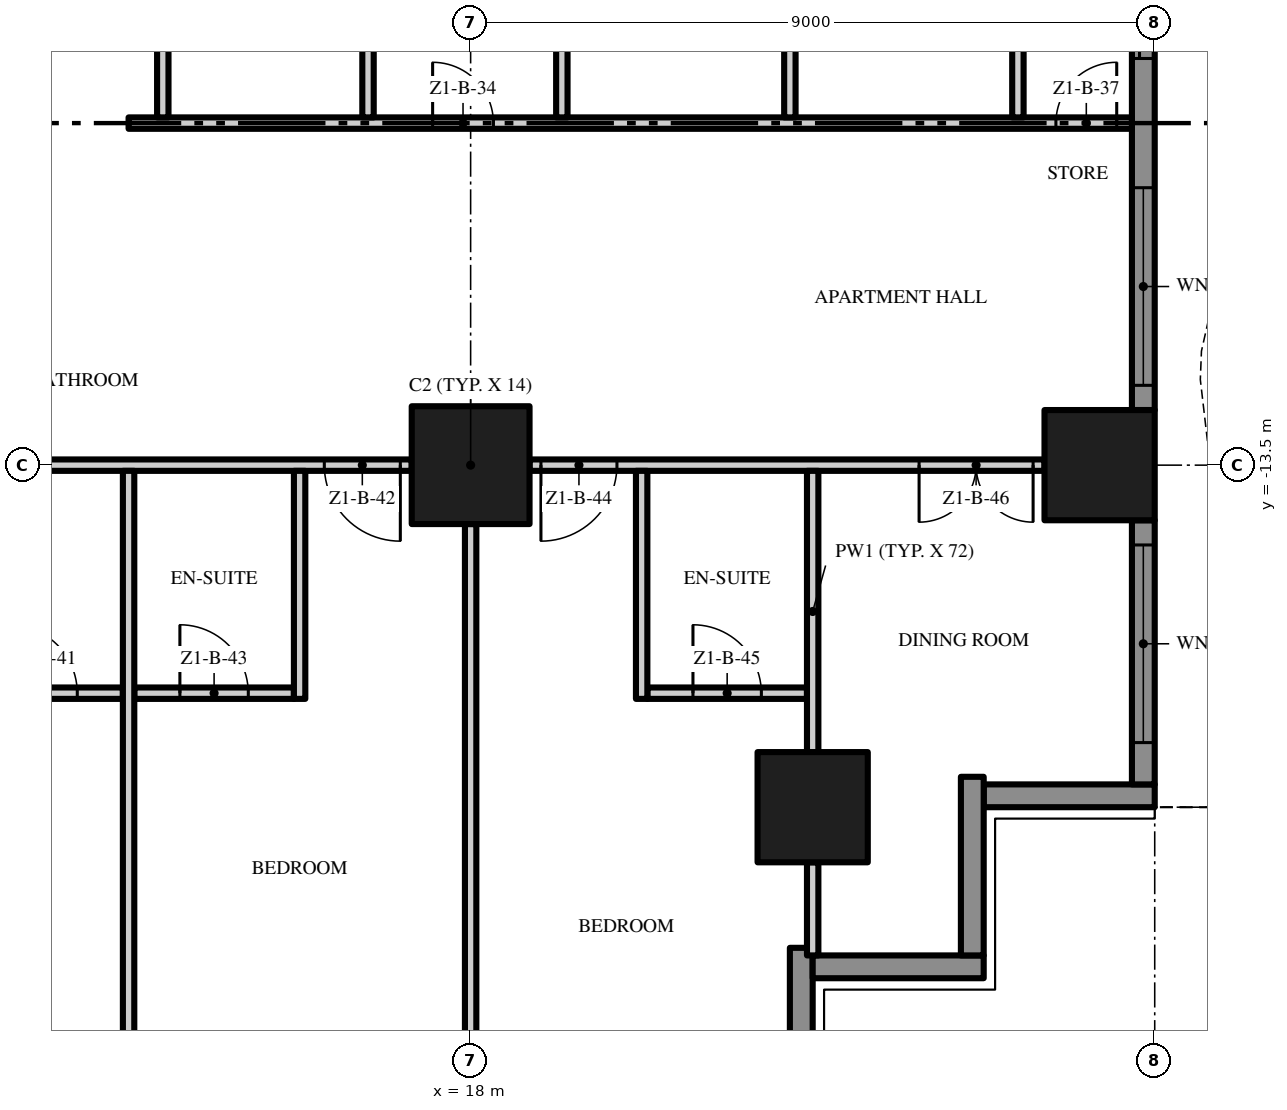
"""IFC4 building model, lengths in metres.
Left out: names, types, materials, properties, quantities, classifications, styles, units other than length and angle.
Written with IfcOpenShell. Run it as: python <this file> out.ifc"""

import sys

from ifc_helpers import new_model, si_unit, direction, frame, frame_2d, origin, origin_2d, place, context, subcontext, project, spatial, polyline, rectangle, outline, extrude, element, fill, save


model = new_model("IFC4")
c1 = context("Model", 3, precision=1e-05, world=origin(), true_north=direction((0.0, 1.0)))
c2 = subcontext(c1, "Body", "Model", "MODEL_VIEW")
j1 = project(units=[si_unit("LENGTHUNIT", "METRE"), si_unit("PLANEANGLEUNIT", "RADIAN")], contexts=[c1])
p1 = place(None, origin())
s1 = spatial("IfcSite", under=j1, at=p1, CompositionType="ELEMENT")
p2 = place(p1, origin())
s2 = spatial("IfcBuilding", under=s1, at=p2, CompositionType="ELEMENT")
p3 = place(p2, frame((0.0, 0.0, 26.4)))
s3 = spatial("IfcBuildingStorey", under=s2, at=p3, CompositionType="ELEMENT", Elevation=26.4)
p4 = place(p3, frame((18.0, -13.5, 0.0), z_axis=(0.0, 0.0, 1.0), x_axis=(1.0, 0.0, 0.0)))
e1 = element("IfcColumn", 1, at=p4, inside=s3, PredefinedType="COLUMN", context=c2, shape_type="SweptSolid", body=[
    extrude(rectangle(XDim=1.55, YDim=1.55, at=origin_2d()), origin(), (0.0, 0.0, 1.0), 3.5),
])
for number, where, z_axis, x_axis in (
    (2, (26.275, -13.5, 0.0), (0.0, 0.0, 1.0), (1.0, 0.0, 0.0)),
    (3, (22.5, -18.0, 0.0), (0.0, 0.0, 1.0), (1.0, 0.0, 0.0)),
):
    element("IfcColumn", number, at=place(p3, frame(where, z_axis=z_axis, x_axis=x_axis)), inside=s3, PredefinedType="COLUMN", context=c2, shape_type="SweptSolid", body=[
        extrude(rectangle(XDim=1.45, YDim=1.45, at=origin_2d()), origin(), (0.0, 0.0, 1.0), 3.5),
    ])
p5 = place(p3, frame((22.35, -19.85, 0.0), z_axis=(0.0, 0.0, 1.0), x_axis=(0.0, -1.0, 0.0)))
e4 = element("IfcWall", 4, at=p5, inside=s3, PredefinedType="SOLIDWALL", context=c2, shape_type="SweptSolid", body=[
    extrude(rectangle(XDim=2.35, YDim=0.3, at=frame_2d((1.175, 0.0))), origin(), (0.0, 0.0, 1.0), 3.5),
])
p6 = place(p3, frame((24.75, -20.1, 0.0), z_axis=(0.0, 0.0, 1.0), x_axis=(-1.0, 0.0, 0.0)))
e5 = element("IfcWall", 5, at=p6, inside=s3, PredefinedType="SOLIDWALL", context=c2, shape_type="SweptSolid", body=[
    extrude(rectangle(XDim=2.25, YDim=0.3, at=frame_2d((1.125, 0.0))), origin(), (0.0, 0.0, 1.0), 3.5),
])
p7 = place(p3, frame((24.6, -17.6, 0.0), z_axis=(0.0, 0.0, 1.0), x_axis=(0.0, -1.0, 0.0)))
e6 = element("IfcWall", 6, at=p7, inside=s3, PredefinedType="SOLIDWALL", context=c2, shape_type="SweptSolid", body=[
    extrude(rectangle(XDim=2.35, YDim=0.3, at=frame_2d((1.175, 0.0))), origin(), (0.0, 0.0, 1.0), 3.5),
])
p8 = place(p3, frame((27.0, -17.85, 0.0), z_axis=(0.0, 0.0, 1.0), x_axis=(-1.0, 0.0, 0.0)))
e7 = element("IfcWall", 7, at=p8, inside=s3, PredefinedType="SOLIDWALL", context=c2, shape_type="SweptSolid", body=[
    extrude(rectangle(XDim=2.25, YDim=0.3, at=frame_2d((1.125, 0.0))), origin(), (0.0, 0.0, 1.0), 3.5),
])
p9 = place(p3, frame((26.85, -14.225, 0.0), z_axis=(0.0, 0.0, 1.0), x_axis=(0.0, -1.0, 0.0)))
e8 = element("IfcWall", 8, at=p9, inside=s3, PredefinedType="SOLIDWALL", context=c2, shape_type="SweptSolid", body=[
    extrude(rectangle(XDim=3.475, YDim=0.3, at=frame_2d((1.738, 0.0))), origin(), (0.0, 0.0, 1.0), 3.5),
])
p10 = place(p9, frame((0.325, 0.0, 0.45)))
e9 = element("IfcOpeningElement", 9, at=p10, cuts=e8, PredefinedType="OPENING", context=c2, shape_type="SweptSolid", body=[
    extrude(rectangle(XDim=2.6, YDim=2.65, at=frame_2d((1.3, 1.325))), frame((0.0, 0.16, 0.0), z_axis=(0.0, -1.0, 0.0), x_axis=(1.0, 0.0, 0.0)), (0.0, 0.0, 1.0), 0.32),
])
p11 = place(p3, frame((26.85, -5.225, 0.0), z_axis=(0.0, 0.0, 1.0), x_axis=(0.0, -1.0, 0.0)))
e10 = element("IfcWall", 10, at=p11, inside=s3, PredefinedType="SOLIDWALL", context=c2, shape_type="SweptSolid", body=[
    extrude(rectangle(XDim=7.55, YDim=0.3, at=frame_2d((3.775, 0.0))), origin(), (0.0, 0.0, 1.0), 3.5),
])
p12 = place(p11, frame((4.625, 0.0, 0.45)))
e11 = element("IfcOpeningElement", 11, at=p12, cuts=e10, PredefinedType="OPENING", context=c2, shape_type="SweptSolid", body=[
    extrude(rectangle(XDim=2.6, YDim=2.65, at=frame_2d((1.3, 1.325))), frame((0.0, 0.16, 0.0), z_axis=(0.0, -1.0, 0.0), x_axis=(1.0, 0.0, 0.0)), (0.0, 0.0, 1.0), 0.32),
])
p13 = place(p11, frame((0.325, 0.0, 0.0)))
e12 = element("IfcOpeningElement", 12, at=p13, cuts=e10, PredefinedType="OPENING", context=c2, shape_type="SweptSolid", body=[
    extrude(rectangle(XDim=2.6, YDim=2.4, at=frame_2d((1.3, 1.2))), frame((0.0, 0.16, 0.0), z_axis=(0.0, -1.0, 0.0), x_axis=(1.0, 0.0, 0.0)), (0.0, 0.0, 1.0), 0.32),
])
p14 = place(p3, origin())
e13 = element("IfcWall", 13, at=p14, inside=s3, PredefinedType="USERDEFINED", context=c2, shape_type="SweptSolid", body=[
    extrude(outline(polyline([(29.649, -18.0), (28.988, -16.5), (28.255, -15.0), (27.731, -13.5), (27.6, -12.375), (27.615, -12.0), (27.951, -10.5), (28.612, -9.0), (29.345, -7.5), (29.869, -6.0), (30.0, -4.875), (29.985, -4.5), (29.649, -3.0), (28.988, -1.5), (28.255, 0.0), (27.731, 1.5), (27.6, 2.625), (27.615, 3.0), (27.951, 4.5), (28.612, 6.0), (29.345, 7.5), (29.869, 9.0), (30.0, 10.125), (29.985, 10.5), (29.649, 12.0), (28.988, 13.5), (28.255, 15.0), (27.731, 16.5), (27.6, 17.625), (27.615, 18.0), (27.365, 18.01), (27.349, 17.615), (27.486, 16.444), (28.024, 14.904), (28.761, 13.395), (29.41, 11.921), (29.736, 10.467), (29.749, 10.135), (29.624, 9.056), (29.114, 7.596), (28.385, 6.105), (27.713, 4.579), (27.366, 3.033), (27.349, 2.615), (27.486, 1.444), (28.024, -0.096), (28.761, -1.605), (29.41, -3.079), (29.736, -4.533), (29.749, -4.865), (29.624, -5.944), (29.114, -7.404), (28.385, -8.895), (27.713, -10.421), (27.366, -11.967), (27.349, -12.385), (27.486, -13.556), (28.024, -15.096), (28.761, -16.605), (29.42, -18.101), (29.649, -18.0)])), origin(), (0.0, 0.0, 1.0), 0.9),
])
p15 = place(p3, frame((11.325, -16.5, 0.0), z_axis=(0.0, 0.0, 1.0), x_axis=(1.0, 0.0, 0.0)))
e14 = element("IfcWall", 14, at=p15, inside=s3, PredefinedType="PARTITIONING", context=c2, shape_type="SweptSolid", body=[
    extrude(rectangle(XDim=2.1, YDim=0.15, at=frame_2d((1.05, 0.0))), origin(), (0.0, 0.0, 1.0), 3.5),
])
p16 = place(p15, frame((0.6, 0.0, 0.0)))
e15 = element("IfcOpeningElement", 15, at=p16, cuts=e14, PredefinedType="OPENING", context=c2, shape_type="SweptSolid", body=[
    extrude(rectangle(XDim=0.9, YDim=2.1, at=frame_2d((0.45, 1.05))), frame((0.0, 0.085, 0.0), z_axis=(0.0, -1.0, 0.0), x_axis=(1.0, 0.0, 0.0)), (0.0, 0.0, 1.0), 0.17),
])
p17 = place(p3, frame((13.575, -16.5, 0.0), z_axis=(0.0, 0.0, 1.0), x_axis=(1.0, 0.0, 0.0)))
e16 = element("IfcWall", 16, at=p17, inside=s3, PredefinedType="PARTITIONING", context=c2, shape_type="SweptSolid", body=[
    extrude(rectangle(XDim=2.1, YDim=0.15, at=frame_2d((1.05, 0.0))), origin(), (0.0, 0.0, 1.0), 3.5),
])
p18 = place(p17, frame((0.6, 0.0, 0.0)))
e17 = element("IfcOpeningElement", 17, at=p18, cuts=e16, PredefinedType="OPENING", context=c2, shape_type="SweptSolid", body=[
    extrude(rectangle(XDim=0.9, YDim=2.1, at=frame_2d((0.45, 1.05))), frame((0.0, 0.085, 0.0), z_axis=(0.0, -1.0, 0.0), x_axis=(1.0, 0.0, 0.0)), (0.0, 0.0, 1.0), 0.17),
])
p19 = place(p3, frame((20.325, -16.5, 0.0), z_axis=(0.0, 0.0, 1.0), x_axis=(1.0, 0.0, 0.0)))
e18 = element("IfcWall", 18, at=p19, inside=s3, PredefinedType="PARTITIONING", context=c2, shape_type="SweptSolid", body=[
    extrude(rectangle(XDim=2.1, YDim=0.15, at=frame_2d((1.05, 0.0))), origin(), (0.0, 0.0, 1.0), 3.5),
])
p20 = place(p19, frame((0.6, 0.0, 0.0)))
e19 = element("IfcOpeningElement", 19, at=p20, cuts=e18, PredefinedType="OPENING", context=c2, shape_type="SweptSolid", body=[
    extrude(rectangle(XDim=0.9, YDim=2.1, at=frame_2d((0.45, 1.05))), frame((0.0, 0.085, 0.0), z_axis=(0.0, -1.0, 0.0), x_axis=(1.0, 0.0, 0.0)), (0.0, 0.0, 1.0), 0.17),
])
p21 = place(p3, frame((17.225, -13.5, 0.0), z_axis=(0.0, 0.0, 1.0), x_axis=(-1.0, 0.0, 0.0)))
e20 = element("IfcWall", 20, at=p21, inside=s3, PredefinedType="PARTITIONING", context=c2, shape_type="SweptSolid", body=[
    extrude(rectangle(XDim=7.45, YDim=0.15, at=frame_2d((3.725, 0.0))), origin(), (0.0, 0.0, 1.0), 3.5),
])
p22 = place(p21, frame((6.3, 0.0, 0.0)))
e21 = element("IfcOpeningElement", 21, at=p22, cuts=e20, PredefinedType="OPENING", context=c2, shape_type="SweptSolid", body=[
    extrude(rectangle(XDim=1.0, YDim=2.4, at=frame_2d((0.5, 1.2))), frame((0.0, 0.085, 0.0), z_axis=(0.0, -1.0, 0.0), x_axis=(1.0, 0.0, 0.0)), (0.0, 0.0, 1.0), 0.17),
])
p23 = place(p21, frame((0.15, 0.0, 0.0)))
e22 = element("IfcOpeningElement", 22, at=p23, cuts=e20, PredefinedType="OPENING", context=c2, shape_type="SweptSolid", body=[
    extrude(rectangle(XDim=1.0, YDim=2.4, at=frame_2d((0.5, 1.2))), frame((0.0, 0.085, 0.0), z_axis=(0.0, -1.0, 0.0), x_axis=(1.0, 0.0, 0.0)), (0.0, 0.0, 1.0), 0.17),
])
p24 = place(p3, frame((25.55, -13.5, 0.0), z_axis=(0.0, 0.0, 1.0), x_axis=(-1.0, 0.0, 0.0)))
e23 = element("IfcWall", 23, at=p24, inside=s3, PredefinedType="PARTITIONING", context=c2, shape_type="SweptSolid", body=[
    extrude(rectangle(XDim=6.775, YDim=0.15, at=frame_2d((3.388, 0.0))), origin(), (0.0, 0.0, 1.0), 3.5),
])
p25 = place(p24, frame((5.625, 0.0, 0.0)))
e24 = element("IfcOpeningElement", 24, at=p25, cuts=e23, PredefinedType="OPENING", context=c2, shape_type="SweptSolid", body=[
    extrude(rectangle(XDim=1.0, YDim=2.4, at=frame_2d((0.5, 1.2))), frame((0.0, 0.085, 0.0), z_axis=(0.0, -1.0, 0.0), x_axis=(1.0, 0.0, 0.0)), (0.0, 0.0, 1.0), 0.17),
])
p26 = place(p24, frame((0.15, 0.0, 0.0)))
e25 = element("IfcOpeningElement", 25, at=p26, cuts=e23, PredefinedType="OPENING", context=c2, shape_type="SweptSolid", body=[
    extrude(rectangle(XDim=1.5, YDim=2.4, at=frame_2d((0.75, 1.2))), frame((0.0, 0.085, 0.0), z_axis=(0.0, -1.0, 0.0), x_axis=(1.0, 0.0, 0.0)), (0.0, 0.0, 1.0), 0.17),
])
p27 = place(p3, frame((13.5, -9.0, 0.0), z_axis=(0.0, 0.0, 1.0), x_axis=(1.0, 0.0, 0.0)))
e26 = element("IfcWall", 26, at=p27, inside=s3, PredefinedType="PARTITIONING", context=c2, shape_type="SweptSolid", body=[
    extrude(rectangle(XDim=13.2, YDim=0.15, at=frame_2d((6.6, 0.0))), origin(), (0.0, 0.0, 1.0), 3.5),
])
p28 = place(p27, frame((4.0, 0.0, 0.0)))
e27 = element("IfcOpeningElement", 27, at=p28, cuts=e26, PredefinedType="OPENING", context=c2, shape_type="SweptSolid", body=[
    extrude(rectangle(XDim=0.8, YDim=2.0, at=frame_2d((0.4, 1.0))), frame((0.0, 0.085, 0.0), z_axis=(0.0, -1.0, 0.0), x_axis=(1.0, 0.0, 0.0)), (0.0, 0.0, 1.0), 0.17),
])
p29 = place(p27, frame((12.2, 0.0, 0.0)))
e28 = element("IfcOpeningElement", 28, at=p29, cuts=e26, PredefinedType="OPENING", context=c2, shape_type="SweptSolid", body=[
    extrude(rectangle(XDim=0.8, YDim=2.0, at=frame_2d((0.4, 1.0))), frame((0.0, 0.085, 0.0), z_axis=(0.0, -1.0, 0.0), x_axis=(1.0, 0.0, 0.0)), (0.0, 0.0, 1.0), 0.17),
])
p30 = place(p3, frame((13.5, -22.2, 0.0), z_axis=(0.0, 0.0, 1.0), x_axis=(0.0, 1.0, 0.0)))
e29 = element("IfcWall", 29, at=p30, inside=s3, PredefinedType="PARTITIONING", context=c2, shape_type="SweptSolid", body=[
    extrude(rectangle(XDim=8.625, YDim=0.15, at=frame_2d((4.312, 0.0))), origin(), (0.0, 0.0, 1.0), 3.5),
])
p31 = place(p3, frame((13.95, -8.925, 0.0), z_axis=(0.0, 0.0, 1.0), x_axis=(0.0, 1.0, 0.0)))
e30 = element("IfcWall", 30, at=p31, inside=s3, PredefinedType="PARTITIONING", context=c2, shape_type="SweptSolid", body=[
    extrude(rectangle(XDim=4.5, YDim=0.15, at=frame_2d((2.25, 0.0))), origin(), (0.0, 0.0, 1.0), 3.5),
])
p32 = place(p3, frame((15.75, -16.575, 0.0), z_axis=(0.0, 0.0, 1.0), x_axis=(0.0, 1.0, 0.0)))
e31 = element("IfcWall", 31, at=p32, inside=s3, PredefinedType="PARTITIONING", context=c2, shape_type="SweptSolid", body=[
    extrude(rectangle(XDim=3.0, YDim=0.15, at=frame_2d((1.5, 0.0))), origin(), (0.0, 0.0, 1.0), 3.5),
])
p33 = place(p3, frame((16.65, -8.925, 0.0), z_axis=(0.0, 0.0, 1.0), x_axis=(0.0, 1.0, 0.0)))
e32 = element("IfcWall", 32, at=p33, inside=s3, PredefinedType="PARTITIONING", context=c2, shape_type="SweptSolid", body=[
    extrude(rectangle(XDim=4.35, YDim=0.15, at=frame_2d((2.175, 0.0))), origin(), (0.0, 0.0, 1.0), 3.5),
])
p34 = place(p3, frame((18.0, -21.05, 0.0), z_axis=(0.0, 0.0, 1.0), x_axis=(0.0, 1.0, 0.0)))
e33 = element("IfcWall", 33, at=p34, inside=s3, PredefinedType="PARTITIONING", context=c2, shape_type="SweptSolid", body=[
    extrude(rectangle(XDim=6.775, YDim=0.15, at=frame_2d((3.388, 0.0))), origin(), (0.0, 0.0, 1.0), 3.5),
])
p35 = place(p3, frame((19.2, -8.925, 0.0), z_axis=(0.0, 0.0, 1.0), x_axis=(0.0, 1.0, 0.0)))
e34 = element("IfcWall", 34, at=p35, inside=s3, PredefinedType="PARTITIONING", context=c2, shape_type="SweptSolid", body=[
    extrude(rectangle(XDim=4.35, YDim=0.15, at=frame_2d((2.175, 0.0))), origin(), (0.0, 0.0, 1.0), 3.5),
])
p36 = place(p3, frame((20.25, -16.575, 0.0), z_axis=(0.0, 0.0, 1.0), x_axis=(0.0, 1.0, 0.0)))
e35 = element("IfcWall", 35, at=p36, inside=s3, PredefinedType="PARTITIONING", context=c2, shape_type="SweptSolid", body=[
    extrude(rectangle(XDim=3.0, YDim=0.15, at=frame_2d((1.5, 0.0))), origin(), (0.0, 0.0, 1.0), 3.5),
])
p37 = place(p3, frame((22.2, -8.925, 0.0), z_axis=(0.0, 0.0, 1.0), x_axis=(0.0, 1.0, 0.0)))
e36 = element("IfcWall", 36, at=p37, inside=s3, PredefinedType="PARTITIONING", context=c2, shape_type="SweptSolid", body=[
    extrude(rectangle(XDim=4.35, YDim=0.15, at=frame_2d((2.175, 0.0))), origin(), (0.0, 0.0, 1.0), 3.5),
])
p38 = place(p3, frame((22.5, -19.95, 0.0), z_axis=(0.0, 0.0, 1.0), x_axis=(0.0, 1.0, 0.0)))
e37 = element("IfcWall", 37, at=p38, inside=s3, PredefinedType="PARTITIONING", context=c2, shape_type="SweptSolid", body=[
    extrude(rectangle(XDim=1.225, YDim=0.15, at=frame_2d((0.613, 0.0))), origin(), (0.0, 0.0, 1.0), 3.5),
])
p39 = place(p3, frame((22.5, -17.275, 0.0), z_axis=(0.0, 0.0, 1.0), x_axis=(0.0, 1.0, 0.0)))
e38 = element("IfcWall", 38, at=p39, inside=s3, PredefinedType="PARTITIONING", context=c2, shape_type="SweptSolid", body=[
    extrude(rectangle(XDim=3.7, YDim=0.15, at=frame_2d((1.85, 0.0))), origin(), (0.0, 0.0, 1.0), 3.5),
])
p40 = place(p3, frame((25.2, -8.925, 0.0), z_axis=(0.0, 0.0, 1.0), x_axis=(0.0, 1.0, 0.0)))
e39 = element("IfcWall", 39, at=p40, inside=s3, PredefinedType="PARTITIONING", context=c2, shape_type="SweptSolid", body=[
    extrude(rectangle(XDim=4.35, YDim=0.15, at=frame_2d((2.175, 0.0))), origin(), (0.0, 0.0, 1.0), 3.5),
])
p41 = place(p10, origin())
e40 = element("IfcWindow", 40, at=p41, inside=s3, PartitioningType="SINGLE_PANEL", PredefinedType="WINDOW", context=c2, shape_type="SweptSolid", body=[
    extrude(rectangle(XDim=2.6, YDim=2.65, at=frame_2d((1.3, 1.325))), frame((0.0, 0.03, 0.0), z_axis=(0.0, -1.0, 0.0), x_axis=(1.0, 0.0, 0.0)), (0.0, 0.0, 1.0), 0.06),
])
fill(e9, e40)
p42 = place(p12, origin())
e41 = element("IfcWindow", 41, at=p42, inside=s3, PartitioningType="SINGLE_PANEL", PredefinedType="WINDOW", context=c2, shape_type="SweptSolid", body=[
    extrude(rectangle(XDim=2.6, YDim=2.65, at=frame_2d((1.3, 1.325))), frame((0.0, 0.03, 0.0), z_axis=(0.0, -1.0, 0.0), x_axis=(1.0, 0.0, 0.0)), (0.0, 0.0, 1.0), 0.06),
])
fill(e11, e41)
p43 = place(p13, origin())
e42 = element("IfcDoor", 42, at=p43, inside=s3, OperationType="SINGLE_SWING_LEFT", PredefinedType="DOOR", context=c2, shape_type="SweptSolid", body=[
    extrude(rectangle(XDim=2.6, YDim=2.4, at=frame_2d((1.3, 1.2))), frame((0.0, 0.025, 0.0), z_axis=(0.0, -1.0, 0.0), x_axis=(1.0, 0.0, 0.0)), (0.0, 0.0, 1.0), 0.05),
])
fill(e12, e42)
p44 = place(p28, origin())
e43 = element("IfcDoor", 43, at=p44, inside=s3, OperationType="SINGLE_SWING_LEFT", PredefinedType="DOOR", context=c2, shape_type="SweptSolid", body=[
    extrude(rectangle(XDim=0.8, YDim=2.0, at=frame_2d((0.4, 1.0))), frame((0.0, 0.025, 0.0), z_axis=(0.0, -1.0, 0.0), x_axis=(1.0, 0.0, 0.0)), (0.0, 0.0, 1.0), 0.05),
])
fill(e27, e43)
p45 = place(p29, origin())
e44 = element("IfcDoor", 44, at=p45, inside=s3, OperationType="SINGLE_SWING_RIGHT", PredefinedType="DOOR", context=c2, shape_type="SweptSolid", body=[
    extrude(rectangle(XDim=0.8, YDim=2.0, at=frame_2d((0.4, 1.0))), frame((0.0, 0.025, 0.0), z_axis=(0.0, -1.0, 0.0), x_axis=(1.0, 0.0, 0.0)), (0.0, 0.0, 1.0), 0.05),
])
fill(e28, e44)
p46 = place(p16, origin())
e45 = element("IfcDoor", 45, at=p46, inside=s3, OperationType="SINGLE_SWING_LEFT", PredefinedType="DOOR", context=c2, shape_type="SweptSolid", body=[
    extrude(rectangle(XDim=0.9, YDim=2.1, at=frame_2d((0.45, 1.05))), frame((0.0, 0.025, 0.0), z_axis=(0.0, -1.0, 0.0), x_axis=(1.0, 0.0, 0.0)), (0.0, 0.0, 1.0), 0.05),
])
fill(e15, e45)
p47 = place(p23, origin())
e46 = element("IfcDoor", 46, at=p47, inside=s3, OperationType="SINGLE_SWING_LEFT", PredefinedType="DOOR", context=c2, shape_type="SweptSolid", body=[
    extrude(rectangle(XDim=1.0, YDim=2.4, at=frame_2d((0.5, 1.2))), frame((0.0, 0.025, 0.0), z_axis=(0.0, -1.0, 0.0), x_axis=(1.0, 0.0, 0.0)), (0.0, 0.0, 1.0), 0.05),
])
fill(e22, e46)
p48 = place(p18, origin())
e47 = element("IfcDoor", 47, at=p48, inside=s3, OperationType="SINGLE_SWING_LEFT", PredefinedType="DOOR", context=c2, shape_type="SweptSolid", body=[
    extrude(rectangle(XDim=0.9, YDim=2.1, at=frame_2d((0.45, 1.05))), frame((0.0, 0.025, 0.0), z_axis=(0.0, -1.0, 0.0), x_axis=(1.0, 0.0, 0.0)), (0.0, 0.0, 1.0), 0.05),
])
fill(e17, e47)
p49 = place(p25, origin())
e48 = element("IfcDoor", 48, at=p49, inside=s3, OperationType="SINGLE_SWING_RIGHT", PredefinedType="DOOR", context=c2, shape_type="SweptSolid", body=[
    extrude(rectangle(XDim=1.0, YDim=2.4, at=frame_2d((0.5, 1.2))), frame((0.0, 0.025, 0.0), z_axis=(0.0, -1.0, 0.0), x_axis=(1.0, 0.0, 0.0)), (0.0, 0.0, 1.0), 0.05),
])
fill(e24, e48)
p50 = place(p20, origin())
e49 = element("IfcDoor", 49, at=p50, inside=s3, OperationType="SINGLE_SWING_LEFT", PredefinedType="DOOR", context=c2, shape_type="SweptSolid", body=[
    extrude(rectangle(XDim=0.9, YDim=2.1, at=frame_2d((0.45, 1.05))), frame((0.0, 0.025, 0.0), z_axis=(0.0, -1.0, 0.0), x_axis=(1.0, 0.0, 0.0)), (0.0, 0.0, 1.0), 0.05),
])
fill(e19, e49)
p51 = place(p26, origin())
e50 = element("IfcDoor", 50, at=p51, inside=s3, OperationType="DOUBLE_DOOR_SINGLE_SWING", PredefinedType="DOOR", context=c2, shape_type="SweptSolid", body=[
    extrude(rectangle(XDim=1.5, YDim=2.4, at=frame_2d((0.75, 1.2))), frame((0.0, 0.025, 0.0), z_axis=(0.0, -1.0, 0.0), x_axis=(1.0, 0.0, 0.0)), (0.0, 0.0, 1.0), 0.05),
])
fill(e25, e50)
save(model, sys.argv[1])
